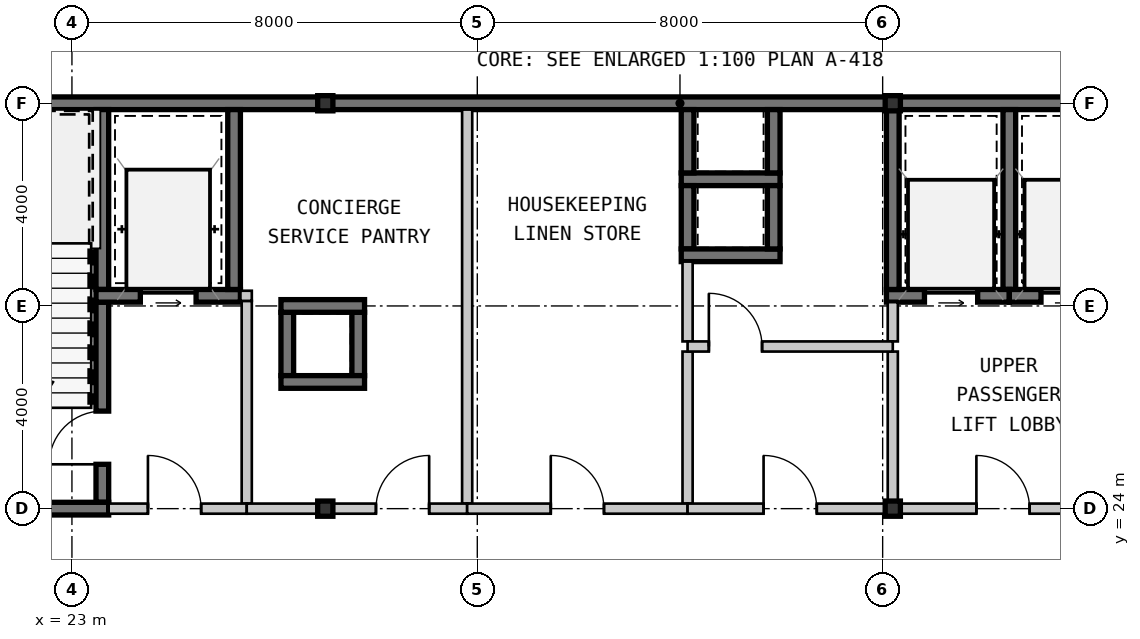
"""IFC4 building model, lengths in metres.
Left out: names, types, materials, properties, quantities, classifications, styles, units other than length and angle.
Written with IfcOpenShell. Run it as: python <this file> out.ifc"""

import sys

from ifc_helpers import new_model, si_unit, direction, frame, frame_2d, origin, origin_2d, place, context, subcontext, project, spatial, rectangle, hollow_rectangle, extrude, source, transform, mapped, element, fill, save


model = new_model("IFC4")
c1 = context("Model", 3, precision=1e-05, world=origin(), true_north=direction((0.0, 1.0)))
c2 = subcontext(c1, "Body", "Model", "MODEL_VIEW")
j1 = project(units=[si_unit("LENGTHUNIT", "METRE"), si_unit("PLANEANGLEUNIT", "RADIAN")], contexts=[c1])
p1 = place(None, origin())
s1 = spatial("IfcSite", under=j1, at=p1, CompositionType="ELEMENT")
p2 = place(p1, origin())
s2 = spatial("IfcBuilding", under=s1, at=p2, CompositionType="ELEMENT")
p3 = place(p2, frame((0.0, 0.0, 211.4)))
s3 = spatial("IfcBuildingStorey", under=s2, at=p3, CompositionType="ELEMENT", Elevation=211.4)
m1 = source(origin(), c2, "Body", "SweptSolid", [
    extrude(hollow_rectangle(XDim=0.3, YDim=0.3, WallThickness=0.012, at=origin_2d()), origin(), (0.0, 0.0, 1.0), 3.15),
])
for number, where, z_axis, x_axis in (
    (1, (28.0, 24.0, 0.0), (0.0, 0.0, 1.0), (1.0, 0.0, 0.0)),
    (2, (39.2, 24.0, 0.0), (0.0, 0.0, 1.0), (1.0, 0.0, 0.0)),
    (3, (28.0, 32.0, 0.0), (0.0, 0.0, 1.0), (1.0, 0.0, 0.0)),
    (4, (39.2, 32.0, 0.0), (0.0, 0.0, 1.0), (1.0, 0.0, 0.0)),
):
    element("IfcColumn", number, at=place(p3, frame(where, z_axis=z_axis, x_axis=x_axis)), inside=s3, PredefinedType="COLUMN", context=c2, shape_type="MappedRepresentation", body=[
        mapped(m1, transform((0.0, 0.0, 0.0), scale=1.0)),
    ])
m2 = source(origin(), c2, "Body", "SweptSolid", [
    extrude(rectangle(XDim=9.125, YDim=0.25, at=frame_2d((4.562, 0.0))), origin(), (0.0, 0.0, 1.0), 2.93),
])
p4 = place(p3, frame((18.875, 32.0, 0.0), z_axis=(0.0, 0.0, 1.0), x_axis=(1.0, 0.0, 0.0)))
e5 = element("IfcWall", 5, at=p4, inside=s3, PredefinedType="SHEAR", context=c2, shape_type="MappedRepresentation", body=[
    mapped(m2, transform((0.0, 0.0, 0.0), scale=1.0)),
])
m3 = source(origin(), c2, "Body", "SweptSolid", [
    extrude(rectangle(XDim=11.2, YDim=0.25, at=frame_2d((5.6, 0.0))), origin(), (0.0, 0.0, 1.0), 2.93),
])
p5 = place(p3, frame((28.0, 32.0, 0.0), z_axis=(0.0, 0.0, 1.0), x_axis=(1.0, 0.0, 0.0)))
e6 = element("IfcWall", 6, at=p5, inside=s3, PredefinedType="SHEAR", context=c2, shape_type="MappedRepresentation", body=[
    mapped(m3, transform((0.0, 0.0, 0.0), scale=1.0)),
])
m4 = source(origin(), c2, "Body", "SweptSolid", [
    extrude(rectangle(XDim=11.925, YDim=0.25, at=frame_2d((5.962, 0.0))), origin(), (0.0, 0.0, 1.0), 2.93),
])
p6 = place(p3, frame((39.2, 32.0, 0.0), z_axis=(0.0, 0.0, 1.0), x_axis=(1.0, 0.0, 0.0)))
e7 = element("IfcWall", 7, at=p6, inside=s3, PredefinedType="SHEAR", context=c2, shape_type="MappedRepresentation", body=[
    mapped(m4, transform((0.0, 0.0, 0.0), scale=1.0)),
])
m5 = source(origin(), c2, "Body", "SweptSolid", [
    extrude(rectangle(XDim=3.55, YDim=0.25, at=frame_2d((1.775, 0.0))), origin(), (0.0, 0.0, 1.0), 2.93),
])
p7 = place(p3, frame((23.6, 28.325, 0.0), z_axis=(0.0, 0.0, 1.0), x_axis=(0.0, 1.0, 0.0)))
e8 = element("IfcWall", 8, at=p7, inside=s3, PredefinedType="SHEAR", context=c2, shape_type="MappedRepresentation", body=[
    mapped(m5, transform((0.0, 0.0, 0.0), scale=1.0)),
])
m6 = source(origin(), c2, "Body", "SweptSolid", [
    extrude(rectangle(XDim=3.95, YDim=0.25, at=frame_2d((1.975, 0.0))), origin(), (0.0, 0.0, 1.0), 2.93),
])
p8 = place(p3, frame((23.6, 24.125, 0.0), z_axis=(0.0, 0.0, 1.0), x_axis=(0.0, 1.0, 0.0)))
e9 = element("IfcWall", 9, at=p8, inside=s3, PredefinedType="SHEAR", context=c2, shape_type="MappedRepresentation", body=[
    mapped(m6, transform((0.0, 0.0, 0.0), scale=1.0)),
])
m7 = source(origin(), c2, "Body", "SweptSolid", [
    extrude(rectangle(XDim=1.05, YDim=2.1, at=frame_2d((0.525, 1.05))), frame((0.0, 0.135, 0.0), z_axis=(0.0, -1.0, 0.0), x_axis=(1.0, 0.0, 0.0)), (0.0, 0.0, 1.0), 0.27),
])
p9 = place(p8, frame((0.75, 0.0, 0.0)))
e10 = element("IfcOpeningElement", 10, at=p9, cuts=e9, PredefinedType="OPENING", context=c2, shape_type="MappedRepresentation", body=[
    mapped(m7, transform((0.0, 0.0, 0.0), scale=1.0)),
])
m8 = source(origin(), c2, "Body", "SweptSolid", [
    extrude(rectangle(XDim=4.85, YDim=0.25, at=frame_2d((2.425, 0.0))), origin(), (0.0, 0.0, 1.0), 2.93),
])
p10 = place(p3, frame((18.875, 24.0, 0.0), z_axis=(0.0, 0.0, 1.0), x_axis=(1.0, 0.0, 0.0)))
e11 = element("IfcWall", 11, at=p10, inside=s3, PredefinedType="SHEAR", context=c2, shape_type="MappedRepresentation", body=[
    mapped(m8, transform((0.0, 0.0, 0.0), scale=1.0)),
])
m9 = source(origin(), c2, "Body", "SweptSolid", [
    extrude(rectangle(XDim=2.85, YDim=0.25, at=frame_2d((1.425, 0.0))), origin(), (0.0, 0.0, 1.0), 2.93),
])
p11 = place(p3, frame((23.475, 28.2, 0.0), z_axis=(0.0, 0.0, 1.0), x_axis=(1.0, 0.0, 0.0)))
e12 = element("IfcWall", 12, at=p11, inside=s3, PredefinedType="SHEAR", context=c2, shape_type="MappedRepresentation", body=[
    mapped(m9, transform((0.0, 0.0, 0.0), scale=1.0)),
])
m10 = source(origin(), c2, "Body", "SweptSolid", [
    extrude(rectangle(XDim=1.1, YDim=2.15, at=frame_2d((0.55, 1.075))), frame((0.0, 0.135, 0.0), z_axis=(0.0, -1.0, 0.0), x_axis=(1.0, 0.0, 0.0)), (0.0, 0.0, 1.0), 0.27),
])
p12 = place(p11, frame((0.875, 0.0, 0.0)))
e13 = element("IfcOpeningElement", 13, at=p12, cuts=e12, PredefinedType="OPENING", context=c2, shape_type="MappedRepresentation", body=[
    mapped(m10, transform((0.0, 0.0, 0.0), scale=1.0)),
])
p13 = place(p3, frame((26.2, 28.325, 0.0), z_axis=(0.0, 0.0, 1.0), x_axis=(0.0, 1.0, 0.0)))
e14 = element("IfcWall", 14, at=p13, inside=s3, PredefinedType="SHEAR", context=c2, shape_type="MappedRepresentation", body=[
    mapped(m5, transform((0.0, 0.0, 0.0), scale=1.0)),
])
m11 = source(origin(), c2, "Body", "SweptSolid", [
    extrude(rectangle(XDim=4.0, YDim=0.2, at=frame_2d((2.0, 0.0))), origin(), (0.0, 0.0, 1.0), 2.93),
])
p14 = place(p3, frame((26.45, 24.1, 0.0), z_axis=(0.0, 0.0, 1.0), x_axis=(0.0, 1.0, 0.0)))
e15 = element("IfcWall", 15, at=p14, inside=s3, PredefinedType="SOLIDWALL", context=c2, shape_type="MappedRepresentation", body=[
    mapped(m11, transform((0.0, 0.0, 0.0), scale=1.0)),
])
m12 = source(origin(), c2, "Body", "SweptSolid", [
    extrude(rectangle(XDim=2.725, YDim=0.2, at=frame_2d((1.362, 0.0))), origin(), (0.0, 0.0, 1.0), 2.47),
])
p15 = place(p3, frame((23.725, 24.0, 0.0), z_axis=(0.0, 0.0, 1.0), x_axis=(1.0, 0.0, 0.0)))
e16 = element("IfcWall", 16, at=p15, inside=s3, PredefinedType="SOLIDWALL", context=c2, shape_type="MappedRepresentation", body=[
    mapped(m12, transform((0.0, 0.0, 0.0), scale=1.0)),
])
m13 = source(origin(), c2, "Body", "SweptSolid", [
    extrude(rectangle(XDim=1.05, YDim=2.1, at=frame_2d((0.525, 1.05))), frame((0.0, 0.11, 0.0), z_axis=(0.0, -1.0, 0.0), x_axis=(1.0, 0.0, 0.0)), (0.0, 0.0, 1.0), 0.22),
])
p16 = place(p15, frame((0.775, 0.0, 0.0)))
e17 = element("IfcOpeningElement", 17, at=p16, cuts=e16, PredefinedType="OPENING", context=c2, shape_type="MappedRepresentation", body=[
    mapped(m13, transform((0.0, 0.0, 0.0), scale=1.0)),
])
m14 = source(origin(), c2, "Body", "SweptSolid", [
    extrude(rectangle(XDim=1.95, YDim=0.25, at=frame_2d((0.975, 0.0))), origin(), (0.0, 0.0, 1.0), 2.93),
])
p17 = place(p3, frame((35.025, 30.5, 0.0), z_axis=(0.0, 0.0, 1.0), x_axis=(1.0, 0.0, 0.0)))
e18 = element("IfcWall", 18, at=p17, inside=s3, PredefinedType="SHEAR", context=c2, shape_type="MappedRepresentation", body=[
    mapped(m14, transform((0.0, 0.0, 0.0), scale=1.0)),
])
m15 = source(origin(), c2, "Body", "SweptSolid", [
    extrude(rectangle(XDim=1.25, YDim=0.25, at=frame_2d((0.625, 0.0))), origin(), (0.0, 0.0, 1.0), 2.93),
])
for number, where, z_axis, x_axis in (
    (19, (35.15, 31.875, 0.0), (0.0, 0.0, 1.0), (0.0, -1.0, 0.0)),
    (20, (36.85, 30.625, 0.0), (0.0, 0.0, 1.0), (0.0, 1.0, 0.0)),
    (21, (35.15, 30.375, 0.0), (0.0, 0.0, 1.0), (0.0, -1.0, 0.0)),
):
    element("IfcWall", number, at=place(p3, frame(where, z_axis=z_axis, x_axis=x_axis)), inside=s3, PredefinedType="SHEAR", context=c2, shape_type="MappedRepresentation", body=[
        mapped(m15, transform((0.0, 0.0, 0.0), scale=1.0)),
    ])
p18 = place(p3, frame((35.025, 29.0, 0.0), z_axis=(0.0, 0.0, 1.0), x_axis=(1.0, 0.0, 0.0)))
e22 = element("IfcWall", 22, at=p18, inside=s3, PredefinedType="SHEAR", context=c2, shape_type="MappedRepresentation", body=[
    mapped(m14, transform((0.0, 0.0, 0.0), scale=1.0)),
])
for number, where, z_axis, x_axis in (
    (23, (36.85, 29.125, 0.0), (0.0, 0.0, 1.0), (0.0, 1.0, 0.0)),
    (24, (28.65, 26.625, 0.0), (0.0, 0.0, 1.0), (0.0, 1.0, 0.0)),
    (25, (27.25, 27.875, 0.0), (0.0, 0.0, 1.0), (0.0, -1.0, 0.0)),
):
    element("IfcWall", number, at=place(p3, frame(where, z_axis=z_axis, x_axis=x_axis)), inside=s3, PredefinedType="SHEAR", context=c2, shape_type="MappedRepresentation", body=[
        mapped(m15, transform((0.0, 0.0, 0.0), scale=1.0)),
    ])
m16 = source(origin(), c2, "Body", "SweptSolid", [
    extrude(rectangle(XDim=1.65, YDim=0.25, at=frame_2d((0.825, 0.0))), origin(), (0.0, 0.0, 1.0), 2.93),
])
for number, where, z_axis, x_axis in (
    (26, (28.775, 28.0, 0.0), (0.0, 0.0, 1.0), (-1.0, 0.0, 0.0)),
    (27, (27.125, 26.5, 0.0), (0.0, 0.0, 1.0), (1.0, 0.0, 0.0)),
):
    element("IfcWall", number, at=place(p3, frame(where, z_axis=z_axis, x_axis=x_axis)), inside=s3, PredefinedType="SHEAR", context=c2, shape_type="MappedRepresentation", body=[
        mapped(m16, transform((0.0, 0.0, 0.0), scale=1.0)),
    ])
p19 = place(p3, frame((41.5, 28.325, 0.0), z_axis=(0.0, 0.0, 1.0), x_axis=(0.0, 1.0, 0.0)))
e28 = element("IfcWall", 28, at=p19, inside=s3, PredefinedType="SHEAR", context=c2, shape_type="MappedRepresentation", body=[
    mapped(m5, transform((0.0, 0.0, 0.0), scale=1.0)),
])
m17 = source(origin(), c2, "Body", "SweptSolid", [
    extrude(rectangle(XDim=2.425, YDim=0.25, at=frame_2d((1.212, 0.0))), origin(), (0.0, 0.0, 1.0), 2.93),
])
p20 = place(p3, frame((39.075, 28.2, 0.0), z_axis=(0.0, 0.0, 1.0), x_axis=(1.0, 0.0, 0.0)))
e29 = element("IfcWall", 29, at=p20, inside=s3, PredefinedType="SHEAR", context=c2, shape_type="MappedRepresentation", body=[
    mapped(m17, transform((0.0, 0.0, 0.0), scale=1.0)),
])
m18 = source(origin(), c2, "Body", "SweptSolid", [
    extrude(rectangle(XDim=1.05, YDim=2.15, at=frame_2d((0.525, 1.075))), frame((0.0, 0.135, 0.0), z_axis=(0.0, -1.0, 0.0), x_axis=(1.0, 0.0, 0.0)), (0.0, 0.0, 1.0), 0.27),
])
p21 = place(p20, frame((0.75, 0.0, 0.0)))
e30 = element("IfcOpeningElement", 30, at=p21, cuts=e29, PredefinedType="OPENING", context=c2, shape_type="MappedRepresentation", body=[
    mapped(m18, transform((0.0, 0.0, 0.0), scale=1.0)),
])
p22 = place(p3, frame((39.2, 31.875, 0.0), z_axis=(0.0, 0.0, 1.0), x_axis=(0.0, -1.0, 0.0)))
e31 = element("IfcWall", 31, at=p22, inside=s3, PredefinedType="SHEAR", context=c2, shape_type="MappedRepresentation", body=[
    mapped(m5, transform((0.0, 0.0, 0.0), scale=1.0)),
])
m19 = source(origin(), c2, "Body", "SweptSolid", [
    extrude(rectangle(XDim=2.07, YDim=0.25, at=frame_2d((1.035, 0.0))), origin(), (0.0, 0.0, 1.0), 2.93),
])
p23 = place(p3, frame((41.5, 28.2, 0.0), z_axis=(0.0, 0.0, 1.0), x_axis=(1.0, 0.0, 0.0)))
e32 = element("IfcWall", 32, at=p23, inside=s3, PredefinedType="SHEAR", context=c2, shape_type="MappedRepresentation", body=[
    mapped(m19, transform((0.0, 0.0, 0.0), scale=1.0)),
])
p24 = place(p23, frame((0.625, 0.0, 0.0)))
e33 = element("IfcOpeningElement", 33, at=p24, cuts=e32, PredefinedType="OPENING", context=c2, shape_type="MappedRepresentation", body=[
    mapped(m18, transform((0.0, 0.0, 0.0), scale=1.0)),
])
m20 = source(origin(), c2, "Body", "SweptSolid", [
    extrude(rectangle(XDim=3.0, YDim=0.2, at=frame_2d((1.5, 0.0))), origin(), (0.0, 0.0, 1.0), 2.47),
])
p25 = place(p3, frame((39.2, 24.1, 0.0), z_axis=(0.0, 0.0, 1.0), x_axis=(0.0, 1.0, 0.0)))
e34 = element("IfcWall", 34, at=p25, inside=s3, PredefinedType="SOLIDWALL", context=c2, shape_type="MappedRepresentation", body=[
    mapped(m20, transform((0.0, 0.0, 0.0), scale=1.0)),
])
m21 = source(origin(), c2, "Body", "SweptSolid", [
    extrude(rectangle(XDim=0.775, YDim=0.2, at=frame_2d((0.387, 0.0))), origin(), (0.0, 0.0, 1.0), 2.47),
])
p26 = place(p3, frame((39.2, 27.3, 0.0), z_axis=(0.0, 0.0, 1.0), x_axis=(0.0, 1.0, 0.0)))
e35 = element("IfcWall", 35, at=p26, inside=s3, PredefinedType="SOLIDWALL", context=c2, shape_type="MappedRepresentation", body=[
    mapped(m21, transform((0.0, 0.0, 0.0), scale=1.0)),
])
m22 = source(origin(), c2, "Body", "SweptSolid", [
    extrude(rectangle(XDim=4.35, YDim=0.2, at=frame_2d((2.175, 0.0))), origin(), (0.0, 0.0, 1.0), 2.397),
])
p27 = place(p3, frame((43.55, 24.0, 0.0), z_axis=(0.0, 0.0, 1.0), x_axis=(-1.0, 0.0, 0.0)))
e36 = element("IfcWall", 36, at=p27, inside=s3, PredefinedType="SOLIDWALL", context=c2, shape_type="MappedRepresentation", body=[
    mapped(m22, transform((0.0, 0.0, 0.0), scale=1.0)),
])
p28 = place(p27, frame((1.65, 0.0, 0.0)))
e37 = element("IfcOpeningElement", 37, at=p28, cuts=e36, PredefinedType="OPENING", context=c2, shape_type="MappedRepresentation", body=[
    mapped(m13, transform((0.0, 0.0, 0.0), scale=1.0)),
])
m23 = source(origin(), c2, "Body", "SweptSolid", [
    extrude(rectangle(XDim=7.775, YDim=0.2, at=frame_2d((3.887, 0.0))), origin(), (0.0, 0.0, 1.0), 2.93),
])
p29 = place(p3, frame((30.8, 31.875, 0.0), z_axis=(0.0, 0.0, 1.0), x_axis=(0.0, -1.0, 0.0)))
e38 = element("IfcWall", 38, at=p29, inside=s3, PredefinedType="SOLIDWALL", context=c2, shape_type="MappedRepresentation", body=[
    mapped(m23, transform((0.0, 0.0, 0.0), scale=1.0)),
])
m24 = source(origin(), c2, "Body", "SweptSolid", [
    extrude(rectangle(XDim=4.35, YDim=0.2, at=frame_2d((2.175, 0.0))), origin(), (0.0, 0.0, 1.0), 2.47),
])
p30 = place(p3, frame((30.8, 24.0, 0.0), z_axis=(0.0, 0.0, 1.0), x_axis=(-1.0, 0.0, 0.0)))
e39 = element("IfcWall", 39, at=p30, inside=s3, PredefinedType="SOLIDWALL", context=c2, shape_type="MappedRepresentation", body=[
    mapped(m24, transform((0.0, 0.0, 0.0), scale=1.0)),
])
p31 = place(p30, frame((0.75, 0.0, 0.0)))
e40 = element("IfcOpeningElement", 40, at=p31, cuts=e39, PredefinedType="OPENING", context=c2, shape_type="MappedRepresentation", body=[
    mapped(m13, transform((0.0, 0.0, 0.0), scale=1.0)),
])
m25 = source(origin(), c2, "Body", "SweptSolid", [
    extrude(rectangle(XDim=3.0, YDim=0.2, at=frame_2d((1.5, 0.0))), origin(), (0.0, 0.0, 1.0), 2.93),
])
p32 = place(p3, frame((35.15, 27.1, 0.0), z_axis=(0.0, 0.0, 1.0), x_axis=(0.0, -1.0, 0.0)))
e41 = element("IfcWall", 41, at=p32, inside=s3, PredefinedType="SOLIDWALL", context=c2, shape_type="MappedRepresentation", body=[
    mapped(m25, transform((0.0, 0.0, 0.0), scale=1.0)),
])
m26 = source(origin(), c2, "Body", "SweptSolid", [
    extrude(rectangle(XDim=1.575, YDim=0.2, at=frame_2d((0.788, 0.0))), origin(), (0.0, 0.0, 1.0), 2.93),
])
p33 = place(p3, frame((35.15, 28.875, 0.0), z_axis=(0.0, 0.0, 1.0), x_axis=(0.0, -1.0, 0.0)))
e42 = element("IfcWall", 42, at=p33, inside=s3, PredefinedType="SOLIDWALL", context=c2, shape_type="MappedRepresentation", body=[
    mapped(m26, transform((0.0, 0.0, 0.0), scale=1.0)),
])
m27 = source(origin(), c2, "Body", "SweptSolid", [
    extrude(rectangle(XDim=4.35, YDim=0.2, at=frame_2d((2.175, 0.0))), origin(), (0.0, 0.0, 1.0), 2.47),
])
p34 = place(p3, frame((35.15, 24.0, 0.0), z_axis=(0.0, 0.0, 1.0), x_axis=(-1.0, 0.0, 0.0)))
e43 = element("IfcWall", 43, at=p34, inside=s3, PredefinedType="SOLIDWALL", context=c2, shape_type="MappedRepresentation", body=[
    mapped(m27, transform((0.0, 0.0, 0.0), scale=1.0)),
])
p35 = place(p34, frame((1.65, 0.0, 0.0)))
e44 = element("IfcOpeningElement", 44, at=p35, cuts=e43, PredefinedType="OPENING", context=c2, shape_type="MappedRepresentation", body=[
    mapped(m13, transform((0.0, 0.0, 0.0), scale=1.0)),
])
m28 = source(origin(), c2, "Body", "SweptSolid", [
    extrude(rectangle(XDim=4.05, YDim=0.2, at=frame_2d((2.025, 0.0))), origin(), (0.0, 0.0, 1.0), 2.93),
])
p36 = place(p3, frame((35.15, 27.2, 0.0), z_axis=(0.0, 0.0, 1.0), x_axis=(1.0, 0.0, 0.0)))
e45 = element("IfcWall", 45, at=p36, inside=s3, PredefinedType="SOLIDWALL", context=c2, shape_type="MappedRepresentation", body=[
    mapped(m28, transform((0.0, 0.0, 0.0), scale=1.0)),
])
p37 = place(p36, frame((0.42, 0.0, 0.0)))
e46 = element("IfcOpeningElement", 46, at=p37, cuts=e45, PredefinedType="OPENING", context=c2, shape_type="MappedRepresentation", body=[
    mapped(m13, transform((0.0, 0.0, 0.0), scale=1.0)),
])
m29 = source(origin(), c2, "Body", "SweptSolid", [
    extrude(rectangle(XDim=4.05, YDim=0.2, at=frame_2d((2.025, 0.0))), origin(), (0.0, 0.0, 1.0), 2.47),
])
p38 = place(p3, frame((39.2, 24.0, 0.0), z_axis=(0.0, 0.0, 1.0), x_axis=(-1.0, 0.0, 0.0)))
e47 = element("IfcWall", 47, at=p38, inside=s3, PredefinedType="SOLIDWALL", context=c2, shape_type="MappedRepresentation", body=[
    mapped(m29, transform((0.0, 0.0, 0.0), scale=1.0)),
])
p39 = place(p38, frame((1.5, 0.0, 0.0)))
e48 = element("IfcOpeningElement", 48, at=p39, cuts=e47, PredefinedType="OPENING", context=c2, shape_type="MappedRepresentation", body=[
    mapped(m13, transform((0.0, 0.0, 0.0), scale=1.0)),
])
m30 = source(origin(), c2, "Body", "SweptSolid", [
    extrude(rectangle(XDim=0.225, YDim=0.2, at=frame_2d((0.113, 0.0))), origin(), (0.0, 0.0, 1.0), 2.93),
])
p40 = place(p3, frame((26.325, 28.2, 0.0), z_axis=(0.0, 0.0, 1.0), x_axis=(1.0, 0.0, 0.0)))
e49 = element("IfcWall", 49, at=p40, inside=s3, PredefinedType="SOLIDWALL", context=c2, shape_type="MappedRepresentation", body=[
    mapped(m30, transform((0.0, 0.0, 0.0), scale=1.0)),
])
m31 = source(origin(), c2, "Body", "SweptSolid", [
    extrude(rectangle(XDim=1.05, YDim=2.1, at=frame_2d((0.525, 1.05))), frame((0.0, 0.025, 0.0), z_axis=(0.0, -1.0, 0.0), x_axis=(1.0, 0.0, 0.0)), (0.0, 0.0, 1.0), 0.05),
])
p41 = place(p9, origin())
e50 = element("IfcDoor", 50, at=p41, inside=s3, OperationType="SINGLE_SWING_LEFT", PredefinedType="DOOR", context=c2, shape_type="MappedRepresentation", body=[
    mapped(m31, transform((0.0, 0.0, 0.0), scale=1.0)),
])
fill(e10, e50)
m32 = source(origin(), c2, "Body", "SweptSolid", [
    extrude(rectangle(XDim=1.1, YDim=2.15, at=frame_2d((0.55, 1.075))), frame((0.0, 0.025, 0.0), z_axis=(0.0, -1.0, 0.0), x_axis=(1.0, 0.0, 0.0)), (0.0, 0.0, 1.0), 0.05),
])
p42 = place(p12, origin())
e51 = element("IfcDoor", 51, at=p42, inside=s3, OperationType="SLIDING_TO_LEFT", PredefinedType="DOOR", context=c2, shape_type="MappedRepresentation", body=[
    mapped(m32, transform((0.0, 0.0, 0.0), scale=1.0)),
])
fill(e13, e51)
p43 = place(p16, origin())
e52 = element("IfcDoor", 52, at=p43, inside=s3, OperationType="SINGLE_SWING_LEFT", PredefinedType="DOOR", context=c2, shape_type="MappedRepresentation", body=[
    mapped(m31, transform((0.0, 0.0, 0.0), scale=1.0)),
])
fill(e17, e52)
m33 = source(origin(), c2, "Body", "SweptSolid", [
    extrude(rectangle(XDim=1.05, YDim=2.15, at=frame_2d((0.525, 1.075))), frame((0.0, 0.025, 0.0), z_axis=(0.0, -1.0, 0.0), x_axis=(1.0, 0.0, 0.0)), (0.0, 0.0, 1.0), 0.05),
])
p44 = place(p21, origin())
e53 = element("IfcDoor", 53, at=p44, inside=s3, OperationType="SLIDING_TO_LEFT", PredefinedType="DOOR", context=c2, shape_type="MappedRepresentation", body=[
    mapped(m33, transform((0.0, 0.0, 0.0), scale=1.0)),
])
fill(e30, e53)
p45 = place(p24, origin())
e54 = element("IfcDoor", 54, at=p45, inside=s3, OperationType="SLIDING_TO_LEFT", PredefinedType="DOOR", context=c2, shape_type="MappedRepresentation", body=[
    mapped(m33, transform((0.0, 0.0, 0.0), scale=1.0)),
])
fill(e33, e54)
p46 = place(p28, frame((1.05, 0.0, 0.0), z_axis=(0.0, 0.0, 1.0), x_axis=(-1.0, 0.0, 0.0)))
e55 = element("IfcDoor", 55, at=p46, inside=s3, OperationType="SINGLE_SWING_LEFT", PredefinedType="DOOR", context=c2, shape_type="MappedRepresentation", body=[
    mapped(m31, transform((0.0, 0.0, 0.0), scale=1.0)),
])
fill(e37, e55)
p47 = place(p31, frame((1.05, 0.0, 0.0), z_axis=(0.0, 0.0, 1.0), x_axis=(-1.0, 0.0, 0.0)))
e56 = element("IfcDoor", 56, at=p47, inside=s3, OperationType="SINGLE_SWING_RIGHT", PredefinedType="DOOR", context=c2, shape_type="MappedRepresentation", body=[
    mapped(m31, transform((0.0, 0.0, 0.0), scale=1.0)),
])
fill(e40, e56)
p48 = place(p35, frame((1.05, 0.0, 0.0), z_axis=(0.0, 0.0, 1.0), x_axis=(-1.0, 0.0, 0.0)))
e57 = element("IfcDoor", 57, at=p48, inside=s3, OperationType="SINGLE_SWING_LEFT", PredefinedType="DOOR", context=c2, shape_type="MappedRepresentation", body=[
    mapped(m31, transform((0.0, 0.0, 0.0), scale=1.0)),
])
fill(e44, e57)
p49 = place(p37, origin())
e58 = element("IfcDoor", 58, at=p49, inside=s3, OperationType="SINGLE_SWING_LEFT", PredefinedType="DOOR", context=c2, shape_type="MappedRepresentation", body=[
    mapped(m31, transform((0.0, 0.0, 0.0), scale=1.0)),
])
fill(e46, e58)
p50 = place(p39, frame((1.05, 0.0, 0.0), z_axis=(0.0, 0.0, 1.0), x_axis=(-1.0, 0.0, 0.0)))
e59 = element("IfcDoor", 59, at=p50, inside=s3, OperationType="SINGLE_SWING_LEFT", PredefinedType="DOOR", context=c2, shape_type="MappedRepresentation", body=[
    mapped(m31, transform((0.0, 0.0, 0.0), scale=1.0)),
])
fill(e48, e59)
save(model, sys.argv[1])
